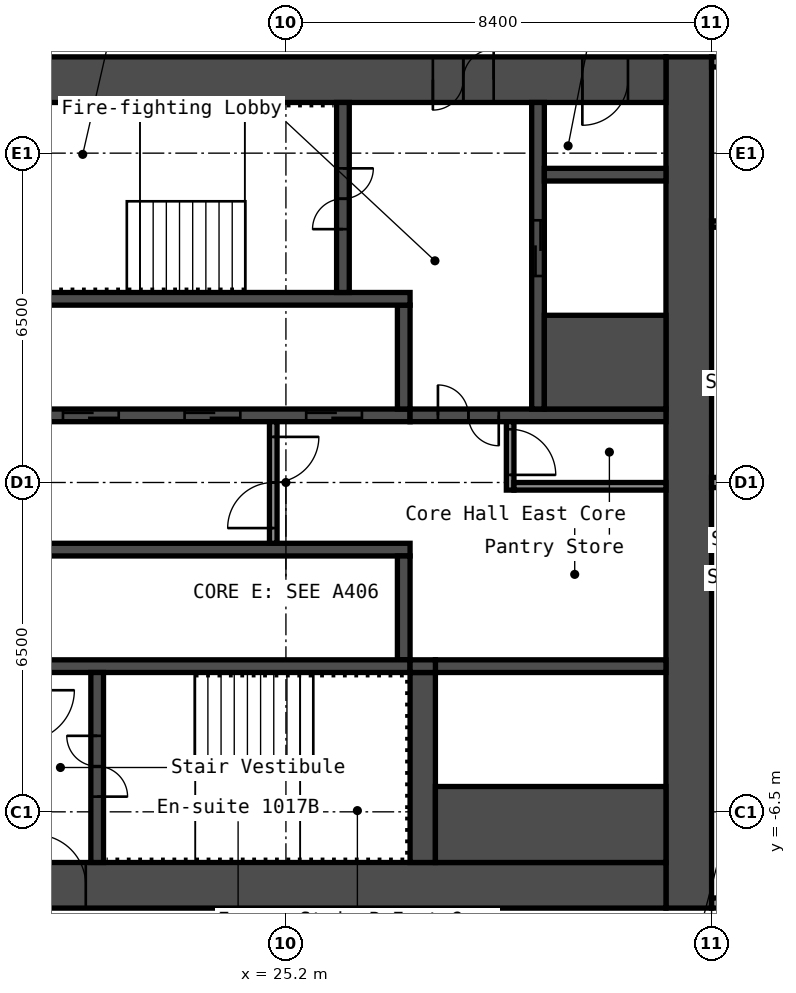
"""IFC4 building model, lengths in metres.
Left out: names, types, materials, properties, quantities, classifications, styles, units other than length and angle.
Written with IfcOpenShell. Run it as: python <this file> out.ifc"""

import sys

from ifc_helpers import new_model, si_unit, direction, frame, frame_2d, origin, place, context, subcontext, project, spatial, rectangle, extrude, element, fill, save


model = new_model("IFC4")
c1 = context("Model", 3, precision=1e-05, world=origin(), true_north=direction((0.0, 1.0)))
c2 = subcontext(c1, "Body", "Model", "MODEL_VIEW")
j1 = project(units=[si_unit("LENGTHUNIT", "METRE"), si_unit("PLANEANGLEUNIT", "RADIAN")], contexts=[c1])
p1 = place(None, origin())
s1 = spatial("IfcSite", under=j1, at=p1, CompositionType="ELEMENT")
p2 = place(p1, origin())
s2 = spatial("IfcBuilding", under=s1, at=p2, CompositionType="ELEMENT")
p3 = place(p2, frame((0.0, 0.0, 39.0)))
s3 = spatial("IfcBuildingStorey", under=s2, at=p3, CompositionType="ELEMENT", Elevation=39.0)
p4 = place(p3, frame((33.15, -8.4, 0.0), z_axis=(0.0, 0.0, 1.0), x_axis=(0.0, 1.0, 0.0)))
e1 = element("IfcWall", 1, at=p4, inside=s3, PredefinedType="SHEAR", context=c2, shape_type="SweptSolid", body=[
    extrude(rectangle(XDim=16.8, YDim=0.9, at=frame_2d((8.4, 0.0))), origin(), (0.0, 0.0, 1.0), 2.8),
])
p5 = place(p3, frame((17.7, 7.95, 0.0), z_axis=(0.0, 0.0, 1.0), x_axis=(1.0, 0.0, 0.0)))
e2 = element("IfcWall", 2, at=p5, inside=s3, PredefinedType="SHEAR", context=c2, shape_type="SweptSolid", body=[
    extrude(rectangle(XDim=15.0, YDim=0.9, at=frame_2d((7.5, 0.0))), origin(), (0.0, 0.0, 1.0), 2.8),
])
p6 = place(p5, frame((10.4, 0.0, 0.0)))
e3 = element("IfcOpeningElement", 3, at=p6, cuts=e2, PredefinedType="OPENING", context=c2, shape_type="SweptSolid", body=[
    extrude(rectangle(XDim=1.2, YDim=2.1, at=frame_2d((0.6, 1.05))), frame((0.0, 0.46, 0.0), z_axis=(0.0, -1.0, 0.0), x_axis=(1.0, 0.0, 0.0)), (0.0, 0.0, 1.0), 0.92),
])
p7 = place(p5, frame((13.35, 0.0, 0.0)))
e4 = element("IfcOpeningElement", 4, at=p7, cuts=e2, PredefinedType="OPENING", context=c2, shape_type="SweptSolid", body=[
    extrude(rectangle(XDim=0.9, YDim=2.1, at=frame_2d((0.45, 1.05))), frame((0.0, 0.46, 0.0), z_axis=(0.0, -1.0, 0.0), x_axis=(1.0, 0.0, 0.0)), (0.0, 0.0, 1.0), 0.92),
])
p8 = place(p3, frame((17.7, -7.95, 0.0), z_axis=(0.0, 0.0, 1.0), x_axis=(1.0, 0.0, 0.0)))
e5 = element("IfcWall", 5, at=p8, inside=s3, PredefinedType="SHEAR", context=c2, shape_type="SweptSolid", body=[
    extrude(rectangle(XDim=15.0, YDim=0.9, at=frame_2d((7.5, 0.0))), origin(), (0.0, 0.0, 1.0), 2.8),
])
p9 = place(p8, frame((2.55, 0.0, 0.0)))
e6 = element("IfcOpeningElement", 6, at=p9, cuts=e5, PredefinedType="OPENING", context=c2, shape_type="SweptSolid", body=[
    extrude(rectangle(XDim=1.0, YDim=2.1, at=frame_2d((0.5, 1.05))), frame((0.0, 0.46, 0.0), z_axis=(0.0, -1.0, 0.0), x_axis=(1.0, 0.0, 0.0)), (0.0, 0.0, 1.0), 0.92),
])
p10 = place(p3, frame((20.15, 1.325, 0.0), z_axis=(0.0, 0.0, 1.0), x_axis=(1.0, 0.0, 0.0)))
e7 = element("IfcWall", 7, at=p10, inside=s3, PredefinedType="SHEAR", context=c2, shape_type="SweptSolid", body=[
    extrude(rectangle(XDim=7.5, YDim=0.25, at=frame_2d((3.75, 0.0))), origin(), (0.0, 0.0, 1.0), 2.8),
])
p11 = place(p10, frame((0.65, 0.0, 0.0)))
e8 = element("IfcOpeningElement", 8, at=p11, cuts=e7, PredefinedType="OPENING", context=c2, shape_type="SweptSolid", body=[
    extrude(rectangle(XDim=1.1, YDim=2.1, at=frame_2d((0.55, 1.05))), frame((0.0, 0.135, 0.0), z_axis=(0.0, -1.0, 0.0), x_axis=(1.0, 0.0, 0.0)), (0.0, 0.0, 1.0), 0.27),
])
p12 = place(p10, frame((3.05, 0.0, 0.0)))
e9 = element("IfcOpeningElement", 9, at=p12, cuts=e7, PredefinedType="OPENING", context=c2, shape_type="SweptSolid", body=[
    extrude(rectangle(XDim=1.1, YDim=2.1, at=frame_2d((0.55, 1.05))), frame((0.0, 0.135, 0.0), z_axis=(0.0, -1.0, 0.0), x_axis=(1.0, 0.0, 0.0)), (0.0, 0.0, 1.0), 0.27),
])
p13 = place(p10, frame((5.45, 0.0, 0.0)))
e10 = element("IfcOpeningElement", 10, at=p13, cuts=e7, PredefinedType="OPENING", context=c2, shape_type="SweptSolid", body=[
    extrude(rectangle(XDim=1.1, YDim=2.1, at=frame_2d((0.55, 1.05))), frame((0.0, 0.135, 0.0), z_axis=(0.0, -1.0, 0.0), x_axis=(1.0, 0.0, 0.0)), (0.0, 0.0, 1.0), 0.27),
])
p14 = place(p3, frame((27.525, 1.45, 0.0), z_axis=(0.0, 0.0, 1.0), x_axis=(0.0, 1.0, 0.0)))
e11 = element("IfcWall", 11, at=p14, inside=s3, PredefinedType="SHEAR", context=c2, shape_type="SweptSolid", body=[
    extrude(rectangle(XDim=2.05, YDim=0.25, at=frame_2d((1.025, 0.0))), origin(), (0.0, 0.0, 1.0), 2.8),
])
p15 = place(p3, frame((20.15, 3.625, 0.0), z_axis=(0.0, 0.0, 1.0), x_axis=(1.0, 0.0, 0.0)))
e12 = element("IfcWall", 12, at=p15, inside=s3, PredefinedType="SHEAR", context=c2, shape_type="SweptSolid", body=[
    extrude(rectangle(XDim=7.5, YDim=0.25, at=frame_2d((3.75, 0.0))), origin(), (0.0, 0.0, 1.0), 2.8),
])
p16 = place(p3, frame((26.325, 3.75, 0.0), z_axis=(0.0, 0.0, 1.0), x_axis=(0.0, 1.0, 0.0)))
e13 = element("IfcWall", 13, at=p16, inside=s3, PredefinedType="SHEAR", context=c2, shape_type="SweptSolid", body=[
    extrude(rectangle(XDim=3.75, YDim=0.25, at=frame_2d((1.875, 0.0))), origin(), (0.0, 0.0, 1.0), 2.8),
])
p17 = place(p16, frame((1.25, 0.0, 0.0)))
e14 = element("IfcOpeningElement", 14, at=p17, cuts=e13, PredefinedType="OPENING", context=c2, shape_type="SweptSolid", body=[
    extrude(rectangle(XDim=1.2, YDim=2.1, at=frame_2d((0.6, 1.05))), frame((0.0, 0.135, 0.0), z_axis=(0.0, -1.0, 0.0), x_axis=(1.0, 0.0, 0.0)), (0.0, 0.0, 1.0), 0.27),
])
p18 = place(p3, frame((27.65, 1.325, 0.0), z_axis=(0.0, 0.0, 1.0), x_axis=(1.0, 0.0, 0.0)))
e15 = element("IfcWall", 15, at=p18, inside=s3, PredefinedType="SHEAR", context=c2, shape_type="SweptSolid", body=[
    extrude(rectangle(XDim=5.05, YDim=0.25, at=frame_2d((2.525, 0.0))), origin(), (0.0, 0.0, 1.0), 2.8),
])
p19 = place(p18, frame((0.55, 0.0, 0.0)))
e16 = element("IfcOpeningElement", 16, at=p19, cuts=e15, PredefinedType="OPENING", context=c2, shape_type="SweptSolid", body=[
    extrude(rectangle(XDim=1.2, YDim=2.1, at=frame_2d((0.6, 1.05))), frame((0.0, 0.135, 0.0), z_axis=(0.0, -1.0, 0.0), x_axis=(1.0, 0.0, 0.0)), (0.0, 0.0, 1.0), 0.27),
])
p20 = place(p3, frame((30.175, 1.45, 0.0), z_axis=(0.0, 0.0, 1.0), x_axis=(0.0, 1.0, 0.0)))
e17 = element("IfcWall", 17, at=p20, inside=s3, PredefinedType="SHEAR", context=c2, shape_type="SweptSolid", body=[
    extrude(rectangle(XDim=6.05, YDim=0.25, at=frame_2d((3.025, 0.0))), origin(), (0.0, 0.0, 1.0), 2.8),
])
p21 = place(p20, frame((2.625, 0.0, 0.0)))
e18 = element("IfcOpeningElement", 18, at=p21, cuts=e17, PredefinedType="OPENING", context=c2, shape_type="SweptSolid", body=[
    extrude(rectangle(XDim=1.1, YDim=2.1, at=frame_2d((0.55, 1.05))), frame((0.0, 0.135, 0.0), z_axis=(0.0, -1.0, 0.0), x_axis=(1.0, 0.0, 0.0)), (0.0, 0.0, 1.0), 0.27),
])
p22 = place(p3, frame((30.3, 2.375, 0.0), z_axis=(0.0, 0.0, 1.0), x_axis=(1.0, 0.0, 0.0)))
e19 = element("IfcWall", 19, at=p22, inside=s3, PredefinedType="SHEAR", context=c2, shape_type="SweptSolid", body=[
    extrude(rectangle(XDim=2.4, YDim=1.85, at=frame_2d((1.2, 0.0))), origin(), (0.0, 0.0, 1.0), 2.8),
])
p23 = place(p3, frame((30.3, 6.075, 0.0), z_axis=(0.0, 0.0, 1.0), x_axis=(1.0, 0.0, 0.0)))
e20 = element("IfcWall", 20, at=p23, inside=s3, PredefinedType="SHEAR", context=c2, shape_type="SweptSolid", body=[
    extrude(rectangle(XDim=2.4, YDim=0.25, at=frame_2d((1.2, 0.0))), origin(), (0.0, 0.0, 1.0), 2.8),
])
p24 = place(p3, frame((20.15, -1.325, 0.0), z_axis=(0.0, 0.0, 1.0), x_axis=(1.0, 0.0, 0.0)))
e21 = element("IfcWall", 21, at=p24, inside=s3, PredefinedType="SHEAR", context=c2, shape_type="SweptSolid", body=[
    extrude(rectangle(XDim=7.5, YDim=0.25, at=frame_2d((3.75, 0.0))), origin(), (0.0, 0.0, 1.0), 2.8),
])
p25 = place(p3, frame((27.525, -3.5, 0.0), z_axis=(0.0, 0.0, 1.0), x_axis=(0.0, 1.0, 0.0)))
e22 = element("IfcWall", 22, at=p25, inside=s3, PredefinedType="SHEAR", context=c2, shape_type="SweptSolid", body=[
    extrude(rectangle(XDim=2.05, YDim=0.25, at=frame_2d((1.025, 0.0))), origin(), (0.0, 0.0, 1.0), 2.8),
])
p26 = place(p3, frame((20.15, -3.625, 0.0), z_axis=(0.0, 0.0, 1.0), x_axis=(1.0, 0.0, 0.0)))
e23 = element("IfcWall", 23, at=p26, inside=s3, PredefinedType="SHEAR", context=c2, shape_type="SweptSolid", body=[
    extrude(rectangle(XDim=7.5, YDim=0.25, at=frame_2d((3.75, 0.0))), origin(), (0.0, 0.0, 1.0), 2.8),
])
p27 = place(p3, frame((21.475, -7.5, 0.0), z_axis=(0.0, 0.0, 1.0), x_axis=(0.0, 1.0, 0.0)))
e24 = element("IfcWall", 24, at=p27, inside=s3, PredefinedType="SHEAR", context=c2, shape_type="SweptSolid", body=[
    extrude(rectangle(XDim=3.75, YDim=0.25, at=frame_2d((1.875, 0.0))), origin(), (0.0, 0.0, 1.0), 2.8),
])
p28 = place(p27, frame((1.3, 0.0, 0.0)))
e25 = element("IfcOpeningElement", 25, at=p28, cuts=e24, PredefinedType="OPENING", context=c2, shape_type="SweptSolid", body=[
    extrude(rectangle(XDim=1.2, YDim=2.1, at=frame_2d((0.6, 1.05))), frame((0.0, 0.135, 0.0), z_axis=(0.0, -1.0, 0.0), x_axis=(1.0, 0.0, 0.0)), (0.0, 0.0, 1.0), 0.27),
])
p29 = place(p3, frame((27.9, -7.5, 0.0), z_axis=(0.0, 0.0, 1.0), x_axis=(0.0, 1.0, 0.0)))
e26 = element("IfcWall", 26, at=p29, inside=s3, PredefinedType="SHEAR", context=c2, shape_type="SweptSolid", body=[
    extrude(rectangle(XDim=3.75, YDim=0.5, at=frame_2d((1.875, 0.0))), origin(), (0.0, 0.0, 1.0), 2.8),
])
p30 = place(p3, frame((28.15, -3.625, 0.0), z_axis=(0.0, 0.0, 1.0), x_axis=(1.0, 0.0, 0.0)))
e27 = element("IfcWall", 27, at=p30, inside=s3, PredefinedType="SHEAR", context=c2, shape_type="SweptSolid", body=[
    extrude(rectangle(XDim=4.55, YDim=0.25, at=frame_2d((2.275, 0.0))), origin(), (0.0, 0.0, 1.0), 2.8),
])
p31 = place(p3, frame((28.15, -6.75, 0.0), z_axis=(0.0, 0.0, 1.0), x_axis=(1.0, 0.0, 0.0)))
e28 = element("IfcWall", 28, at=p31, inside=s3, PredefinedType="SHEAR", context=c2, shape_type="SweptSolid", body=[
    extrude(rectangle(XDim=4.55, YDim=1.5, at=frame_2d((2.275, 0.0))), origin(), (0.0, 0.0, 1.0), 2.8),
])
p32 = place(p3, frame((27.65, -3.625, 0.0), z_axis=(0.0, 0.0, 1.0), x_axis=(1.0, 0.0, 0.0)))
e29 = element("IfcWall", 29, at=p32, inside=s3, PredefinedType="SHEAR", context=c2, shape_type="SweptSolid", body=[
    extrude(rectangle(XDim=0.5, YDim=0.25, at=frame_2d((0.25, 0.0))), origin(), (0.0, 0.0, 1.0), 2.8),
])
p33 = place(p3, frame((24.95, -1.2, 0.0), z_axis=(0.0, 0.0, 1.0), x_axis=(0.0, 1.0, 0.0)))
e30 = element("IfcWall", 30, at=p33, inside=s3, PredefinedType="PARTITIONING", context=c2, shape_type="SweptSolid", body=[
    extrude(rectangle(XDim=2.4, YDim=0.15, at=frame_2d((1.2, 0.0))), origin(), (0.0, 0.0, 1.0), 2.8),
])
p34 = place(p33, frame((0.3, 0.0, 0.0)))
e31 = element("IfcOpeningElement", 31, at=p34, cuts=e30, PredefinedType="OPENING", context=c2, shape_type="SweptSolid", body=[
    extrude(rectangle(XDim=1.8, YDim=2.1, at=frame_2d((0.9, 1.05))), frame((0.0, 0.085, 0.0), z_axis=(0.0, -1.0, 0.0), x_axis=(1.0, 0.0, 0.0)), (0.0, 0.0, 1.0), 0.17),
])
p35 = place(p3, frame((29.625, -0.15, 0.0), z_axis=(0.0, 0.0, 1.0), x_axis=(0.0, 1.0, 0.0)))
e32 = element("IfcWall", 32, at=p35, inside=s3, PredefinedType="PARTITIONING", context=c2, shape_type="SweptSolid", body=[
    extrude(rectangle(XDim=1.35, YDim=0.15, at=frame_2d((0.675, 0.0))), origin(), (0.0, 0.0, 1.0), 2.8),
])
p36 = place(p35, frame((0.3, 0.0, 0.0)))
e33 = element("IfcOpeningElement", 33, at=p36, cuts=e32, PredefinedType="OPENING", context=c2, shape_type="SweptSolid", body=[
    extrude(rectangle(XDim=0.9, YDim=2.1, at=frame_2d((0.45, 1.05))), frame((0.0, 0.085, 0.0), z_axis=(0.0, -1.0, 0.0), x_axis=(1.0, 0.0, 0.0)), (0.0, 0.0, 1.0), 0.17),
])
p37 = place(p3, frame((29.7, -0.075, 0.0), z_axis=(0.0, 0.0, 1.0), x_axis=(1.0, 0.0, 0.0)))
e34 = element("IfcWall", 34, at=p37, inside=s3, PredefinedType="PARTITIONING", context=c2, shape_type="SweptSolid", body=[
    extrude(rectangle(XDim=3.0, YDim=0.15, at=frame_2d((1.5, 0.0))), origin(), (0.0, 0.0, 1.0), 2.8),
])
p38 = place(p3, frame((33.6, -8.3, 0.0), z_axis=(0.0, 0.0, 1.0), x_axis=(1.0, 0.0, 0.0)))
e35 = element("IfcWall", 35, at=p38, inside=s3, PredefinedType="PARTITIONING", context=c2, shape_type="SweptSolid", body=[
    extrude(rectangle(XDim=15.0, YDim=0.2, at=frame_2d((7.5, 0.0))), origin(), (0.0, 0.0, 1.0), 2.8),
])
p39 = place(p38, frame((1.6, 0.0, 0.0)))
e36 = element("IfcOpeningElement", 36, at=p39, cuts=e35, PredefinedType="OPENING", context=c2, shape_type="SweptSolid", body=[
    extrude(rectangle(XDim=1.0, YDim=2.1, at=frame_2d((0.5, 1.05))), frame((0.0, 0.11, 0.0), z_axis=(0.0, -1.0, 0.0), x_axis=(1.0, 0.0, 0.0)), (0.0, 0.0, 1.0), 0.22),
])
p40 = place(p38, frame((9.55, 0.0, 0.0)))
e37 = element("IfcOpeningElement", 37, at=p40, cuts=e35, PredefinedType="OPENING", context=c2, shape_type="SweptSolid", body=[
    extrude(rectangle(XDim=1.0, YDim=2.1, at=frame_2d((0.5, 1.05))), frame((0.0, 0.11, 0.0), z_axis=(0.0, -1.0, 0.0), x_axis=(1.0, 0.0, 0.0)), (0.0, 0.0, 1.0), 0.22),
])
p41 = place(p3, frame((33.6, 0.0, 0.0), z_axis=(0.0, 0.0, 1.0), x_axis=(1.0, 0.0, 0.0)))
e38 = element("IfcWall", 38, at=p41, inside=s3, PredefinedType="PARTITIONING", context=c2, shape_type="SweptSolid", body=[
    extrude(rectangle(XDim=14.9, YDim=0.2, at=frame_2d((7.45, 0.0))), origin(), (0.0, 0.0, 1.0), 2.8),
])
p42 = place(p3, frame((33.6, 5.1, 0.0), z_axis=(0.0, 0.0, 1.0), x_axis=(1.0, 0.0, 0.0)))
e39 = element("IfcWall", 39, at=p42, inside=s3, PredefinedType="PARTITIONING", context=c2, shape_type="SweptSolid", body=[
    extrude(rectangle(XDim=2.938, YDim=0.125, at=frame_2d((1.469, 0.0))), origin(), (0.0, 0.0, 1.0), 2.8),
])
p43 = place(p42, frame((1.1, 0.0, 0.0)))
e40 = element("IfcOpeningElement", 40, at=p43, cuts=e39, PredefinedType="OPENING", context=c2, shape_type="SweptSolid", body=[
    extrude(rectangle(XDim=0.8, YDim=2.1, at=frame_2d((0.4, 1.05))), frame((0.0, 0.073, 0.0), z_axis=(0.0, -1.0, 0.0), x_axis=(1.0, 0.0, 0.0)), (0.0, 0.0, 1.0), 0.145),
])
p44 = place(p3, frame((33.6, 8.3, 0.0), z_axis=(0.0, 0.0, 1.0), x_axis=(1.0, 0.0, 0.0)))
e41 = element("IfcWall", 41, at=p44, inside=s3, PredefinedType="PARTITIONING", context=c2, shape_type="SweptSolid", body=[
    extrude(rectangle(XDim=15.0, YDim=0.2, at=frame_2d((7.5, 0.0))), origin(), (0.0, 0.0, 1.0), 2.8),
])
p45 = place(p44, frame((5.8, 0.0, 0.0)))
e42 = element("IfcOpeningElement", 42, at=p45, cuts=e41, PredefinedType="OPENING", context=c2, shape_type="SweptSolid", body=[
    extrude(rectangle(XDim=1.0, YDim=2.1, at=frame_2d((0.5, 1.05))), frame((0.0, 0.11, 0.0), z_axis=(0.0, -1.0, 0.0), x_axis=(1.0, 0.0, 0.0)), (0.0, 0.0, 1.0), 0.22),
])
p46 = place(p44, frame((12.85, 0.0, 0.0)))
e43 = element("IfcOpeningElement", 43, at=p46, cuts=e41, PredefinedType="OPENING", context=c2, shape_type="SweptSolid", body=[
    extrude(rectangle(XDim=1.0, YDim=2.1, at=frame_2d((0.5, 1.05))), frame((0.0, 0.11, 0.0), z_axis=(0.0, -1.0, 0.0), x_axis=(1.0, 0.0, 0.0)), (0.0, 0.0, 1.0), 0.22),
])
p47 = place(p6, origin())
e44 = element("IfcDoor", 44, at=p47, inside=s3, OperationType="DOUBLE_DOOR_SINGLE_SWING", PredefinedType="DOOR", context=c2, shape_type="SweptSolid", body=[
    extrude(rectangle(XDim=1.2, YDim=2.1, at=frame_2d((0.6, 1.05))), frame((0.0, 0.025, 0.0), z_axis=(0.0, -1.0, 0.0), x_axis=(1.0, 0.0, 0.0)), (0.0, 0.0, 1.0), 0.05),
])
fill(e3, e44)
p48 = place(p7, origin())
e45 = element("IfcDoor", 45, at=p48, inside=s3, OperationType="SINGLE_SWING_LEFT", PredefinedType="DOOR", context=c2, shape_type="SweptSolid", body=[
    extrude(rectangle(XDim=0.9, YDim=2.1, at=frame_2d((0.45, 1.05))), frame((0.0, 0.025, 0.0), z_axis=(0.0, -1.0, 0.0), x_axis=(1.0, 0.0, 0.0)), (0.0, 0.0, 1.0), 0.05),
])
fill(e4, e45)
p49 = place(p9, origin())
e46 = element("IfcDoor", 46, at=p49, inside=s3, OperationType="SINGLE_SWING_RIGHT", PredefinedType="DOOR", context=c2, shape_type="SweptSolid", body=[
    extrude(rectangle(XDim=1.0, YDim=2.1, at=frame_2d((0.5, 1.05))), frame((0.0, 0.025, 0.0), z_axis=(0.0, -1.0, 0.0), x_axis=(1.0, 0.0, 0.0)), (0.0, 0.0, 1.0), 0.05),
])
fill(e6, e46)
p50 = place(p17, origin())
e47 = element("IfcDoor", 47, at=p50, inside=s3, OperationType="DOUBLE_DOOR_SINGLE_SWING", PredefinedType="DOOR", context=c2, shape_type="SweptSolid", body=[
    extrude(rectangle(XDim=1.2, YDim=2.1, at=frame_2d((0.6, 1.05))), frame((0.0, 0.025, 0.0), z_axis=(0.0, -1.0, 0.0), x_axis=(1.0, 0.0, 0.0)), (0.0, 0.0, 1.0), 0.05),
])
fill(e14, e47)
p51 = place(p28, origin())
e48 = element("IfcDoor", 48, at=p51, inside=s3, OperationType="DOUBLE_DOOR_SINGLE_SWING", PredefinedType="DOOR", context=c2, shape_type="SweptSolid", body=[
    extrude(rectangle(XDim=1.2, YDim=2.1, at=frame_2d((0.6, 1.05))), frame((0.0, 0.025, 0.0), z_axis=(0.0, -1.0, 0.0), x_axis=(1.0, 0.0, 0.0)), (0.0, 0.0, 1.0), 0.05),
])
fill(e25, e48)
p52 = place(p19, origin())
e49 = element("IfcDoor", 49, at=p52, inside=s3, OperationType="DOUBLE_DOOR_SINGLE_SWING", PredefinedType="DOOR", context=c2, shape_type="SweptSolid", body=[
    extrude(rectangle(XDim=1.2, YDim=2.1, at=frame_2d((0.6, 1.05))), frame((0.0, 0.025, 0.0), z_axis=(0.0, -1.0, 0.0), x_axis=(1.0, 0.0, 0.0)), (0.0, 0.0, 1.0), 0.05),
])
fill(e16, e49)
p53 = place(p34, origin())
e50 = element("IfcDoor", 50, at=p53, inside=s3, OperationType="DOUBLE_DOOR_SINGLE_SWING", PredefinedType="DOOR", context=c2, shape_type="SweptSolid", body=[
    extrude(rectangle(XDim=1.8, YDim=2.1, at=frame_2d((0.9, 1.05))), frame((0.0, 0.025, 0.0), z_axis=(0.0, -1.0, 0.0), x_axis=(1.0, 0.0, 0.0)), (0.0, 0.0, 1.0), 0.05),
])
fill(e31, e50)
p54 = place(p36, origin())
e51 = element("IfcDoor", 51, at=p54, inside=s3, OperationType="SINGLE_SWING_LEFT", PredefinedType="DOOR", context=c2, shape_type="SweptSolid", body=[
    extrude(rectangle(XDim=0.9, YDim=2.1, at=frame_2d((0.45, 1.05))), frame((0.0, 0.025, 0.0), z_axis=(0.0, -1.0, 0.0), x_axis=(1.0, 0.0, 0.0)), (0.0, 0.0, 1.0), 0.05),
])
fill(e33, e51)
p55 = place(p11, origin())
e52 = element("IfcDoor", 52, at=p55, inside=s3, OperationType="DOUBLE_DOOR_SLIDING", PredefinedType="DOOR", context=c2, shape_type="SweptSolid", body=[
    extrude(rectangle(XDim=1.1, YDim=2.1, at=frame_2d((0.55, 1.05))), frame((0.0, 0.025, 0.0), z_axis=(0.0, -1.0, 0.0), x_axis=(1.0, 0.0, 0.0)), (0.0, 0.0, 1.0), 0.05),
])
fill(e8, e52)
p56 = place(p12, origin())
e53 = element("IfcDoor", 53, at=p56, inside=s3, OperationType="DOUBLE_DOOR_SLIDING", PredefinedType="DOOR", context=c2, shape_type="SweptSolid", body=[
    extrude(rectangle(XDim=1.1, YDim=2.1, at=frame_2d((0.55, 1.05))), frame((0.0, 0.025, 0.0), z_axis=(0.0, -1.0, 0.0), x_axis=(1.0, 0.0, 0.0)), (0.0, 0.0, 1.0), 0.05),
])
fill(e9, e53)
p57 = place(p13, origin())
e54 = element("IfcDoor", 54, at=p57, inside=s3, OperationType="DOUBLE_DOOR_SLIDING", PredefinedType="DOOR", context=c2, shape_type="SweptSolid", body=[
    extrude(rectangle(XDim=1.1, YDim=2.1, at=frame_2d((0.55, 1.05))), frame((0.0, 0.025, 0.0), z_axis=(0.0, -1.0, 0.0), x_axis=(1.0, 0.0, 0.0)), (0.0, 0.0, 1.0), 0.05),
])
fill(e10, e54)
p58 = place(p21, origin())
e55 = element("IfcDoor", 55, at=p58, inside=s3, OperationType="DOUBLE_DOOR_SLIDING", PredefinedType="DOOR", context=c2, shape_type="SweptSolid", body=[
    extrude(rectangle(XDim=1.1, YDim=2.1, at=frame_2d((0.55, 1.05))), frame((0.0, 0.025, 0.0), z_axis=(0.0, -1.0, 0.0), x_axis=(1.0, 0.0, 0.0)), (0.0, 0.0, 1.0), 0.05),
])
fill(e18, e55)
save(model, sys.argv[1])
